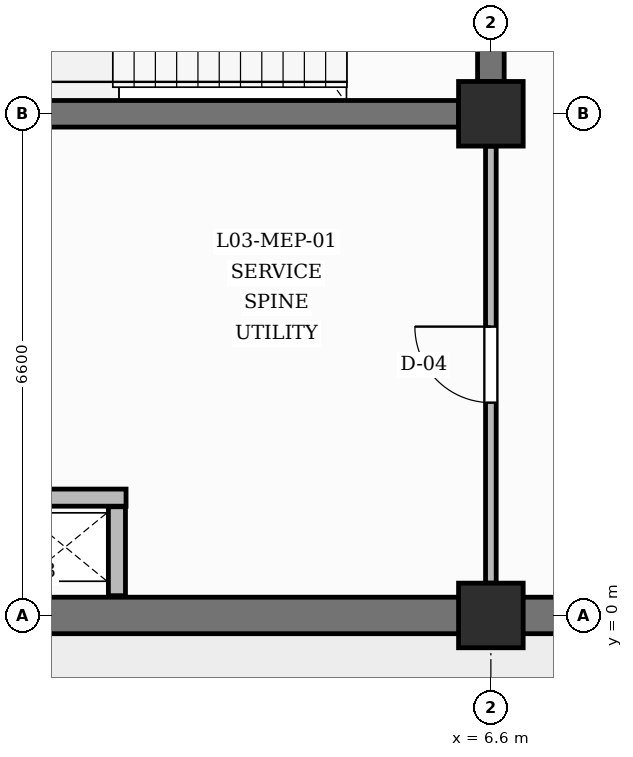
"""IFC4 building model, lengths in metres.
Left out: names, types, materials, properties, quantities, classifications, styles, units other than length and angle.
Written with IfcOpenShell. Run it as: python <this file> out.ifc"""

import sys

from ifc_helpers import new_model, si_unit, direction, frame, frame_2d, origin, origin_2d, place, context, subcontext, project, spatial, rectangle, extrude, element, fill, save


model = new_model("IFC4")
c1 = context("Model", 3, precision=1e-05, world=origin(), true_north=direction((0.0, 1.0)))
c2 = subcontext(c1, "Body", "Model", "MODEL_VIEW")
j1 = project(units=[si_unit("LENGTHUNIT", "METRE"), si_unit("PLANEANGLEUNIT", "RADIAN")], contexts=[c1])
p1 = place(None, origin())
s1 = spatial("IfcSite", under=j1, at=p1, CompositionType="ELEMENT")
p2 = place(p1, origin())
s2 = spatial("IfcBuilding", under=s1, at=p2, CompositionType="ELEMENT")
p3 = place(p2, frame((0.0, 0.0, 14.4)))
s3 = spatial("IfcBuildingStorey", under=s2, at=p3, CompositionType="ELEMENT", Elevation=14.4)
for number, where, z_axis, x_axis in (
    (1, (6.6, 0.0, 0.0), (0.0, 0.0, 1.0), (1.0, 0.0, 0.0)),
    (2, (6.6, 6.6, 0.0), (0.0, 0.0, 1.0), (1.0, 0.0, 0.0)),
):
    element("IfcColumn", number, at=place(p3, frame(where, z_axis=z_axis, x_axis=x_axis)), inside=s3, PredefinedType="COLUMN", context=c2, shape_type="SweptSolid", body=[
        extrude(rectangle(XDim=0.85, YDim=0.85, at=origin_2d()), origin(), (0.0, 0.0, 1.0), 4.2),
    ])
for number, where, z_axis, x_axis in (
    (3, (0.425, 0.0, 0.0), (0.0, 0.0, 1.0), (1.0, 0.0, 0.0)),
    (4, (7.025, 0.0, 0.0), (0.0, 0.0, 1.0), (1.0, 0.0, 0.0)),
):
    element("IfcWall", number, at=place(p3, frame(where, z_axis=z_axis, x_axis=x_axis)), inside=s3, PredefinedType="SOLIDWALL", context=c2, shape_type="SweptSolid", body=[
        extrude(rectangle(XDim=5.75, YDim=0.48, at=frame_2d((2.875, 0.0))), origin(), (0.0, 0.0, 1.0), 3.26),
    ])
p4 = place(p3, frame((0.425, 6.6, 0.0), z_axis=(0.0, 0.0, 1.0), x_axis=(1.0, 0.0, 0.0)))
e5 = element("IfcWall", 5, at=p4, inside=s3, PredefinedType="SHEAR", context=c2, shape_type="SweptSolid", body=[
    extrude(rectangle(XDim=5.75, YDim=0.35, at=frame_2d((2.875, 0.0))), origin(), (0.0, 0.0, 1.0), 3.16),
])
p5 = place(p3, frame((6.6, 7.025, 0.0), z_axis=(0.0, 0.0, 1.0), x_axis=(0.0, 1.0, 0.0)))
e6 = element("IfcWall", 6, at=p5, inside=s3, PredefinedType="SHEAR", context=c2, shape_type="SweptSolid", body=[
    extrude(rectangle(XDim=5.75, YDim=0.35, at=frame_2d((2.875, 0.0))), origin(), (0.0, 0.0, 1.0), 3.16),
])
p6 = place(p5, frame((2.325, 0.0, 0.0)))
e7 = element("IfcOpeningElement", 7, at=p6, cuts=e6, PredefinedType="OPENING", context=c2, shape_type="SweptSolid", body=[
    extrude(rectangle(XDim=1.1, YDim=2.15, at=frame_2d((0.55, 1.075))), frame((0.0, 0.185, 0.0), z_axis=(0.0, -1.0, 0.0), x_axis=(1.0, 0.0, 0.0)), (0.0, 0.0, 1.0), 0.37),
])
p7 = place(p3, frame((1.68, 0.26, 0.0), z_axis=(0.0, 0.0, 1.0), x_axis=(0.0, 1.0, 0.0)))
e8 = element("IfcWall", 8, at=p7, inside=s3, PredefinedType="PARTITIONING", context=c2, shape_type="SweptSolid", body=[
    extrude(rectangle(XDim=1.17, YDim=0.225, at=frame_2d((0.585, 0.0))), origin(), (0.0, 0.0, 1.0), 3.86),
])
p8 = place(p3, frame((0.26, 1.55, 0.0), z_axis=(0.0, 0.0, 1.0), x_axis=(1.0, 0.0, 0.0)))
e9 = element("IfcWall", 9, at=p8, inside=s3, PredefinedType="PARTITIONING", context=c2, shape_type="SweptSolid", body=[
    extrude(rectangle(XDim=1.54, YDim=0.225, at=frame_2d((0.77, 0.0))), origin(), (0.0, 0.0, 1.0), 3.86),
])
p9 = place(p3, frame((6.6, 0.425, 0.0), z_axis=(0.0, 0.0, 1.0), x_axis=(0.0, 1.0, 0.0)))
e10 = element("IfcWall", 10, at=p9, inside=s3, PredefinedType="PARTITIONING", context=c2, shape_type="SweptSolid", body=[
    extrude(rectangle(XDim=5.75, YDim=0.14, at=frame_2d((2.875, 0.0))), origin(), (0.0, 0.0, 1.0), 3.16),
])
p10 = place(p9, frame((2.375, 0.0, 0.0)))
e11 = element("IfcOpeningElement", 11, at=p10, cuts=e10, PredefinedType="OPENING", context=c2, shape_type="SweptSolid", body=[
    extrude(rectangle(XDim=1.0, YDim=2.1, at=frame_2d((0.5, 1.05))), frame((0.0, 0.08, 0.0), z_axis=(0.0, -1.0, 0.0), x_axis=(1.0, 0.0, 0.0)), (0.0, 0.0, 1.0), 0.16),
])
p11 = place(p10, origin())
e12 = element("IfcDoor", 12, at=p11, inside=s3, OperationType="SINGLE_SWING_RIGHT", PredefinedType="DOOR", context=c2, shape_type="SweptSolid", body=[
    extrude(rectangle(XDim=1.0, YDim=2.1, at=frame_2d((0.5, 1.05))), frame((0.0, 0.025, 0.0), z_axis=(0.0, -1.0, 0.0), x_axis=(1.0, 0.0, 0.0)), (0.0, 0.0, 1.0), 0.05),
])
fill(e11, e12)
save(model, sys.argv[1])
